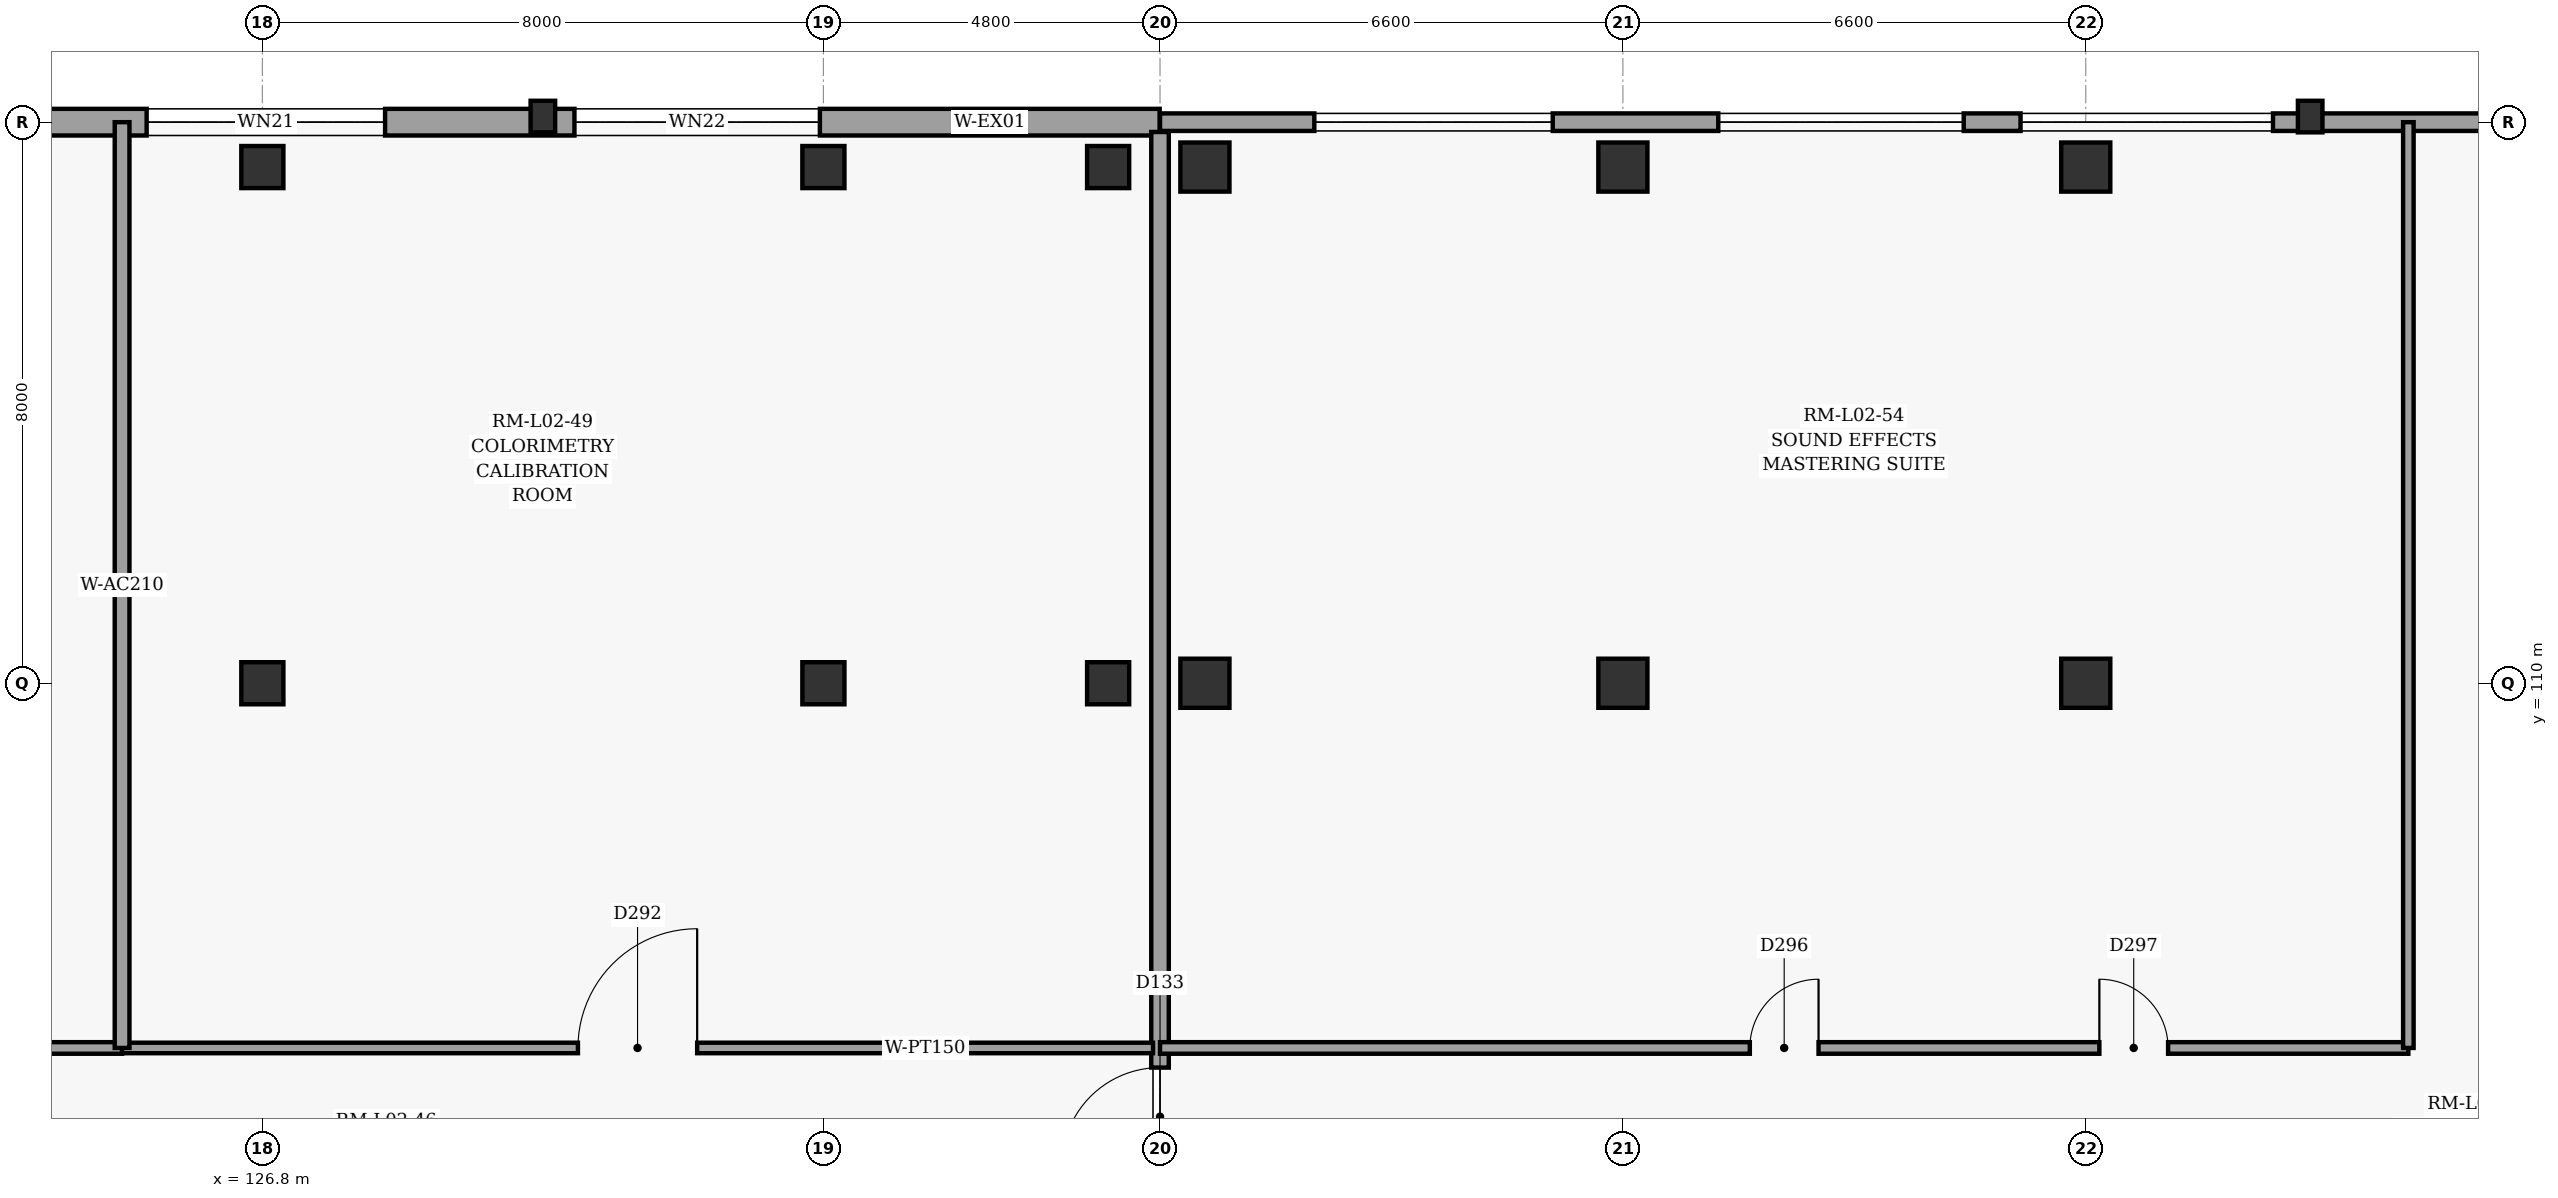
"""IFC4 building model, lengths in metres.
Left out: names, types, materials, properties, quantities, classifications, styles, units other than length and angle.
Written with IfcOpenShell. Run it as: python <this file> out.ifc"""

import sys

from ifc_helpers import new_model, si_unit, direction, frame, frame_2d, origin, origin_2d, place, context, subcontext, project, spatial, rectangle, extrude, element, fill, save


model = new_model("IFC4")
c1 = context("Model", 3, precision=1e-05, world=origin(), true_north=direction((0.0, 1.0)))
c2 = subcontext(c1, "Body", "Model", "MODEL_VIEW")
j1 = project(units=[si_unit("LENGTHUNIT", "METRE"), si_unit("PLANEANGLEUNIT", "RADIAN")], contexts=[c1])
p1 = place(None, origin())
s1 = spatial("IfcSite", under=j1, at=p1, CompositionType="ELEMENT")
p2 = place(p1, origin())
s2 = spatial("IfcBuilding", under=s1, at=p2, CompositionType="ELEMENT")
p3 = place(p2, frame((0.0, 0.0, 10.2)))
s3 = spatial("IfcBuildingStorey", under=s2, at=p3, CompositionType="ELEMENT", Elevation=10.2)
for number, where, z_axis, x_axis in (
    (1, (126.8, 110.0, 0.0), (0.0, 0.0, 1.0), (1.0, 0.0, 0.0)),
    (2, (126.8, 117.36, 0.0), (0.0, 0.0, 1.0), (1.0, 0.0, 0.0)),
    (3, (134.8, 110.0, 0.0), (0.0, 0.0, 1.0), (1.0, 0.0, 0.0)),
    (4, (134.8, 117.36, 0.0), (0.0, 0.0, 1.0), (1.0, 0.0, 0.0)),
    (5, (138.86, 110.0, 0.0), (0.0, 0.0, 1.0), (1.0, 0.0, 0.0)),
    (6, (138.86, 117.36, 0.0), (0.0, 0.0, 1.0), (1.0, 0.0, 0.0)),
):
    element("IfcColumn", number, at=place(p3, frame(where, z_axis=z_axis, x_axis=x_axis)), inside=s3, PredefinedType="COLUMN", context=c2, shape_type="SweptSolid", body=[
        extrude(rectangle(XDim=0.6, YDim=0.6, at=origin_2d()), origin(), (0.0, 0.0, 1.0), 5.4),
    ])
for number, where, z_axis, x_axis in (
    (7, (140.24, 110.0, 0.0), (0.0, 0.0, 1.0), (1.0, 0.0, 0.0)),
    (8, (140.24, 117.36, 0.0), (0.0, 0.0, 1.0), (1.0, 0.0, 0.0)),
    (9, (146.2, 110.0, 0.0), (0.0, 0.0, 1.0), (1.0, 0.0, 0.0)),
    (10, (146.2, 117.36, 0.0), (0.0, 0.0, 1.0), (1.0, 0.0, 0.0)),
    (11, (152.8, 110.0, 0.0), (0.0, 0.0, 1.0), (1.0, 0.0, 0.0)),
    (12, (152.8, 117.36, 0.0), (0.0, 0.0, 1.0), (1.0, 0.0, 0.0)),
):
    element("IfcColumn", number, at=place(p3, frame(where, z_axis=z_axis, x_axis=x_axis)), inside=s3, PredefinedType="COLUMN", context=c2, shape_type="SweptSolid", body=[
        extrude(rectangle(XDim=0.7, YDim=0.7, at=origin_2d()), origin(), (0.0, 0.0, 1.0), 5.4),
    ])
for number, where, z_axis, x_axis in (
    (13, (130.8, 118.08, 0.0), (0.0, 0.0, 1.0), (0.0, 1.0, 0.0)),
    (14, (156.0, 118.08, 0.0), (0.0, 0.0, 1.0), (0.0, 1.0, 0.0)),
):
    element("IfcColumn", number, at=place(p3, frame(where, z_axis=z_axis, x_axis=x_axis)), inside=s3, PredefinedType="PILASTER", context=c2, shape_type="SweptSolid", body=[
        extrude(rectangle(XDim=0.35, YDim=0.45, at=origin_2d()), origin(), (0.0, 0.0, 1.0), 5.4),
    ])
p4 = place(p3, frame((94.8, 118.0, 0.0), z_axis=(0.0, 0.0, 1.0), x_axis=(1.0, 0.0, 0.0)))
e15 = element("IfcWall", 15, at=p4, inside=s3, PredefinedType="SOLIDWALL", context=c2, shape_type="SweptSolid", body=[
    extrude(rectangle(XDim=44.795, YDim=0.38, at=frame_2d((22.397, 0.0))), origin(), (0.0, 0.0, 1.0), 5.16),
])
p5 = place(p4, frame((1.45, 0.0, 0.9)))
e16 = element("IfcOpeningElement", 16, at=p5, cuts=e15, PredefinedType="OPENING", context=c2, shape_type="SweptSolid", body=[
    extrude(rectangle(XDim=1.6, YDim=1.65, at=frame_2d((0.8, 0.825))), frame((0.0, 0.2, 0.0), z_axis=(0.0, -1.0, 0.0), x_axis=(1.0, 0.0, 0.0)), (0.0, 0.0, 1.0), 0.4),
])
p6 = place(p4, frame((8.3, 0.0, 0.9)))
e17 = element("IfcOpeningElement", 17, at=p6, cuts=e15, PredefinedType="OPENING", context=c2, shape_type="SweptSolid", body=[
    extrude(rectangle(XDim=3.1, YDim=2.45, at=frame_2d((1.55, 1.225))), frame((0.0, 0.2, 0.0), z_axis=(0.0, -1.0, 0.0), x_axis=(1.0, 0.0, 0.0)), (0.0, 0.0, 1.0), 0.4),
])
p7 = place(p4, frame((15.9, 0.0, 0.9)))
e18 = element("IfcOpeningElement", 18, at=p7, cuts=e15, PredefinedType="OPENING", context=c2, shape_type="SweptSolid", body=[
    extrude(rectangle(XDim=3.2, YDim=2.5, at=frame_2d((1.6, 1.25))), frame((0.0, 0.2, 0.0), z_axis=(0.0, -1.0, 0.0), x_axis=(1.0, 0.0, 0.0)), (0.0, 0.0, 1.0), 0.4),
])
p8 = place(p4, frame((22.75, 0.0, 0.9)))
e19 = element("IfcOpeningElement", 19, at=p8, cuts=e15, PredefinedType="OPENING", context=c2, shape_type="SweptSolid", body=[
    extrude(rectangle(XDim=3.3, YDim=2.5, at=frame_2d((1.65, 1.25))), frame((0.0, 0.2, 0.0), z_axis=(0.0, -1.0, 0.0), x_axis=(1.0, 0.0, 0.0)), (0.0, 0.0, 1.0), 0.4),
])
p9 = place(p4, frame((30.35, 0.0, 0.9)))
e20 = element("IfcOpeningElement", 20, at=p9, cuts=e15, PredefinedType="OPENING", context=c2, shape_type="SweptSolid", body=[
    extrude(rectangle(XDim=3.4, YDim=2.55, at=frame_2d((1.7, 1.275))), frame((0.0, 0.2, 0.0), z_axis=(0.0, -1.0, 0.0), x_axis=(1.0, 0.0, 0.0)), (0.0, 0.0, 1.0), 0.4),
])
p10 = place(p4, frame((36.45, 0.0, 0.9)))
e21 = element("IfcOpeningElement", 21, at=p10, cuts=e15, PredefinedType="OPENING", context=c2, shape_type="SweptSolid", body=[
    extrude(rectangle(XDim=3.5, YDim=2.55, at=frame_2d((1.75, 1.275))), frame((0.0, 0.2, 0.0), z_axis=(0.0, -1.0, 0.0), x_axis=(1.0, 0.0, 0.0)), (0.0, 0.0, 1.0), 0.4),
])
p11 = place(p3, frame((139.6, 118.0, 0.0), z_axis=(0.0, 0.0, 1.0), x_axis=(1.0, 0.0, 0.0)))
e22 = element("IfcWall", 22, at=p11, inside=s3, PredefinedType="SOLIDWALL", context=c2, shape_type="SweptSolid", body=[
    extrude(rectangle(XDim=32.4, YDim=0.25, at=frame_2d((16.2, 0.0))), origin(), (0.0, 0.0, 1.0), 5.16),
])
p12 = place(p11, frame((2.2, 0.0, 0.9)))
e23 = element("IfcOpeningElement", 23, at=p12, cuts=e22, PredefinedType="OPENING", context=c2, shape_type="SweptSolid", body=[
    extrude(rectangle(XDim=3.4, YDim=2.55, at=frame_2d((1.7, 1.275))), frame((0.0, 0.135, 0.0), z_axis=(0.0, -1.0, 0.0), x_axis=(1.0, 0.0, 0.0)), (0.0, 0.0, 1.0), 0.27),
])
p13 = place(p11, frame((7.96, 0.0, 0.9)))
e24 = element("IfcOpeningElement", 24, at=p13, cuts=e22, PredefinedType="OPENING", context=c2, shape_type="SweptSolid", body=[
    extrude(rectangle(XDim=3.5, YDim=2.55, at=frame_2d((1.75, 1.275))), frame((0.0, 0.135, 0.0), z_axis=(0.0, -1.0, 0.0), x_axis=(1.0, 0.0, 0.0)), (0.0, 0.0, 1.0), 0.27),
])
p14 = place(p11, frame((12.27, 0.0, 0.9)))
e25 = element("IfcOpeningElement", 25, at=p14, cuts=e22, PredefinedType="OPENING", context=c2, shape_type="SweptSolid", body=[
    extrude(rectangle(XDim=3.6, YDim=2.6, at=frame_2d((1.8, 1.3))), frame((0.0, 0.135, 0.0), z_axis=(0.0, -1.0, 0.0), x_axis=(1.0, 0.0, 0.0)), (0.0, 0.0, 1.0), 0.27),
])
p15 = place(p11, frame((19.48, 0.0, 0.9)))
e26 = element("IfcOpeningElement", 26, at=p15, cuts=e22, PredefinedType="OPENING", context=c2, shape_type="SweptSolid", body=[
    extrude(rectangle(XDim=1.6, YDim=1.65, at=frame_2d((0.8, 0.825))), frame((0.0, 0.135, 0.0), z_axis=(0.0, -1.0, 0.0), x_axis=(1.0, 0.0, 0.0)), (0.0, 0.0, 1.0), 0.27),
])
p16 = place(p3, frame((139.6, 71.74, 0.0), z_axis=(0.0, 0.0, 1.0), x_axis=(0.0, 1.0, 0.0)))
e27 = element("IfcWall", 27, at=p16, inside=s3, PredefinedType="SOLIDWALL", context=c2, shape_type="SweptSolid", body=[
    extrude(rectangle(XDim=46.12, YDim=0.25, at=frame_2d((23.06, 0.0))), origin(), (0.0, 0.0, 1.0), 4.31),
])
p17 = place(p16, frame((31.38, 0.0, 0.0)))
e28 = element("IfcOpeningElement", 28, at=p17, cuts=e27, PredefinedType="OPENING", context=c2, shape_type="SweptSolid", body=[
    extrude(rectangle(XDim=1.4, YDim=2.25, at=frame_2d((0.7, 1.125))), frame((0.0, 0.135, 0.0), z_axis=(0.0, -1.0, 0.0), x_axis=(1.0, 0.0, 0.0)), (0.0, 0.0, 1.0), 0.27),
])
p18 = place(p3, frame((109.8, 104.8, 0.0), z_axis=(0.0, 0.0, 1.0), x_axis=(1.0, 0.0, 0.0)))
e29 = element("IfcWall", 29, at=p18, inside=s3, PredefinedType="PARTITIONING", context=c2, shape_type="SweptSolid", body=[
    extrude(rectangle(XDim=15.0, YDim=0.165, at=frame_2d((7.5, 0.0))), origin(), (0.0, 0.0, 1.0), 5.16),
])
p19 = place(p18, frame((6.675, 0.0, 0.0)))
e30 = element("IfcOpeningElement", 30, at=p19, cuts=e29, PredefinedType="OPENING", context=c2, shape_type="SweptSolid", body=[
    extrude(rectangle(XDim=1.65, YDim=2.3, at=frame_2d((0.825, 1.15))), frame((0.0, 0.093, 0.0), z_axis=(0.0, -1.0, 0.0), x_axis=(1.0, 0.0, 0.0)), (0.0, 0.0, 1.0), 0.185),
])
p20 = place(p3, frame((124.8, 104.8, 0.0), z_axis=(0.0, 0.0, 1.0), x_axis=(1.0, 0.0, 0.0)))
e31 = element("IfcWall", 31, at=p20, inside=s3, PredefinedType="PARTITIONING", context=c2, shape_type="SweptSolid", body=[
    extrude(rectangle(XDim=14.7, YDim=0.15, at=frame_2d((7.35, 0.0))), origin(), (0.0, 0.0, 1.0), 5.16),
])
p21 = place(p20, frame((6.5, 0.0, 0.0)))
e32 = element("IfcOpeningElement", 32, at=p21, cuts=e31, PredefinedType="OPENING", context=c2, shape_type="SweptSolid", body=[
    extrude(rectangle(XDim=1.7, YDim=2.3, at=frame_2d((0.85, 1.15))), frame((0.0, 0.085, 0.0), z_axis=(0.0, -1.0, 0.0), x_axis=(1.0, 0.0, 0.0)), (0.0, 0.0, 1.0), 0.17),
])
p22 = place(p3, frame((124.8, 118.0, 0.0), z_axis=(0.0, 0.0, 1.0), x_axis=(0.0, -1.0, 0.0)))
e33 = element("IfcWall", 33, at=p22, inside=s3, PredefinedType="PARTITIONING", context=c2, shape_type="SweptSolid", body=[
    extrude(rectangle(XDim=13.2, YDim=0.21, at=frame_2d((6.6, 0.0))), origin(), (0.0, 0.0, 1.0), 5.16),
])
p23 = place(p3, frame((139.6, 104.8, 0.0), z_axis=(0.0, 0.0, 1.0), x_axis=(1.0, 0.0, 0.0)))
e34 = element("IfcWall", 34, at=p23, inside=s3, PredefinedType="PARTITIONING", context=c2, shape_type="SweptSolid", body=[
    extrude(rectangle(XDim=17.8, YDim=0.165, at=frame_2d((8.9, 0.0))), origin(), (0.0, 0.0, 1.0), 5.16),
])
p24 = place(p23, frame((8.41, 0.0, 0.0)))
e35 = element("IfcOpeningElement", 35, at=p24, cuts=e34, PredefinedType="OPENING", context=c2, shape_type="SweptSolid", body=[
    extrude(rectangle(XDim=0.98, YDim=2.1, at=frame_2d((0.49, 1.05))), frame((0.0, 0.093, 0.0), z_axis=(0.0, -1.0, 0.0), x_axis=(1.0, 0.0, 0.0)), (0.0, 0.0, 1.0), 0.185),
])
p25 = place(p23, frame((13.394, 0.0, 0.0)))
e36 = element("IfcOpeningElement", 36, at=p25, cuts=e34, PredefinedType="OPENING", context=c2, shape_type="SweptSolid", body=[
    extrude(rectangle(XDim=0.98, YDim=2.1, at=frame_2d((0.49, 1.05))), frame((0.0, 0.093, 0.0), z_axis=(0.0, -1.0, 0.0), x_axis=(1.0, 0.0, 0.0)), (0.0, 0.0, 1.0), 0.185),
])
p26 = place(p3, frame((157.4, 104.8, 0.0), z_axis=(0.0, 0.0, 1.0), x_axis=(0.0, 1.0, 0.0)))
e37 = element("IfcWall", 37, at=p26, inside=s3, PredefinedType="PARTITIONING", context=c2, shape_type="SweptSolid", body=[
    extrude(rectangle(XDim=13.2, YDim=0.15, at=frame_2d((6.6, 0.0))), origin(), (0.0, 0.0, 1.0), 5.16),
])
p27 = place(p9, origin())
e38 = element("IfcWindow", 38, at=p27, inside=s3, PartitioningType="SINGLE_PANEL", PredefinedType="WINDOW", context=c2, shape_type="SweptSolid", body=[
    extrude(rectangle(XDim=3.4, YDim=2.55, at=frame_2d((1.7, 1.275))), frame((0.0, 0.03, 0.0), z_axis=(0.0, -1.0, 0.0), x_axis=(1.0, 0.0, 0.0)), (0.0, 0.0, 1.0), 0.06),
])
fill(e20, e38)
p28 = place(p10, origin())
e39 = element("IfcWindow", 39, at=p28, inside=s3, PartitioningType="SINGLE_PANEL", PredefinedType="WINDOW", context=c2, shape_type="SweptSolid", body=[
    extrude(rectangle(XDim=3.5, YDim=2.55, at=frame_2d((1.75, 1.275))), frame((0.0, 0.03, 0.0), z_axis=(0.0, -1.0, 0.0), x_axis=(1.0, 0.0, 0.0)), (0.0, 0.0, 1.0), 0.06),
])
fill(e21, e39)
p29 = place(p12, origin())
e40 = element("IfcWindow", 40, at=p29, inside=s3, PartitioningType="SINGLE_PANEL", PredefinedType="WINDOW", context=c2, shape_type="SweptSolid", body=[
    extrude(rectangle(XDim=3.4, YDim=2.55, at=frame_2d((1.7, 1.275))), frame((0.0, 0.03, 0.0), z_axis=(0.0, -1.0, 0.0), x_axis=(1.0, 0.0, 0.0)), (0.0, 0.0, 1.0), 0.06),
])
fill(e23, e40)
p30 = place(p13, origin())
e41 = element("IfcWindow", 41, at=p30, inside=s3, PartitioningType="SINGLE_PANEL", PredefinedType="WINDOW", context=c2, shape_type="SweptSolid", body=[
    extrude(rectangle(XDim=3.5, YDim=2.55, at=frame_2d((1.75, 1.275))), frame((0.0, 0.03, 0.0), z_axis=(0.0, -1.0, 0.0), x_axis=(1.0, 0.0, 0.0)), (0.0, 0.0, 1.0), 0.06),
])
fill(e24, e41)
p31 = place(p14, origin())
e42 = element("IfcWindow", 42, at=p31, inside=s3, PartitioningType="SINGLE_PANEL", PredefinedType="WINDOW", context=c2, shape_type="SweptSolid", body=[
    extrude(rectangle(XDim=3.6, YDim=2.6, at=frame_2d((1.8, 1.3))), frame((0.0, 0.03, 0.0), z_axis=(0.0, -1.0, 0.0), x_axis=(1.0, 0.0, 0.0)), (0.0, 0.0, 1.0), 0.06),
])
fill(e25, e42)
p32 = place(p17, origin())
e43 = element("IfcDoor", 43, at=p32, inside=s3, OperationType="SINGLE_SWING_LEFT", PredefinedType="DOOR", context=c2, shape_type="SweptSolid", body=[
    extrude(rectangle(XDim=1.4, YDim=2.25, at=frame_2d((0.7, 1.125))), frame((0.0, 0.025, 0.0), z_axis=(0.0, -1.0, 0.0), x_axis=(1.0, 0.0, 0.0)), (0.0, 0.0, 1.0), 0.05),
])
fill(e28, e43)
p33 = place(p21, origin())
e44 = element("IfcDoor", 44, at=p33, inside=s3, OperationType="SINGLE_SWING_RIGHT", PredefinedType="DOOR", context=c2, shape_type="SweptSolid", body=[
    extrude(rectangle(XDim=1.7, YDim=2.3, at=frame_2d((0.85, 1.15))), frame((0.0, 0.025, 0.0), z_axis=(0.0, -1.0, 0.0), x_axis=(1.0, 0.0, 0.0)), (0.0, 0.0, 1.0), 0.05),
])
fill(e32, e44)
p34 = place(p24, origin())
e45 = element("IfcDoor", 45, at=p34, inside=s3, OperationType="SINGLE_SWING_RIGHT", PredefinedType="DOOR", context=c2, shape_type="SweptSolid", body=[
    extrude(rectangle(XDim=0.98, YDim=2.1, at=frame_2d((0.49, 1.05))), frame((0.0, 0.025, 0.0), z_axis=(0.0, -1.0, 0.0), x_axis=(1.0, 0.0, 0.0)), (0.0, 0.0, 1.0), 0.05),
])
fill(e35, e45)
p35 = place(p25, origin())
e46 = element("IfcDoor", 46, at=p35, inside=s3, OperationType="SINGLE_SWING_LEFT", PredefinedType="DOOR", context=c2, shape_type="SweptSolid", body=[
    extrude(rectangle(XDim=0.98, YDim=2.1, at=frame_2d((0.49, 1.05))), frame((0.0, 0.025, 0.0), z_axis=(0.0, -1.0, 0.0), x_axis=(1.0, 0.0, 0.0)), (0.0, 0.0, 1.0), 0.05),
])
fill(e36, e46)
save(model, sys.argv[1])
